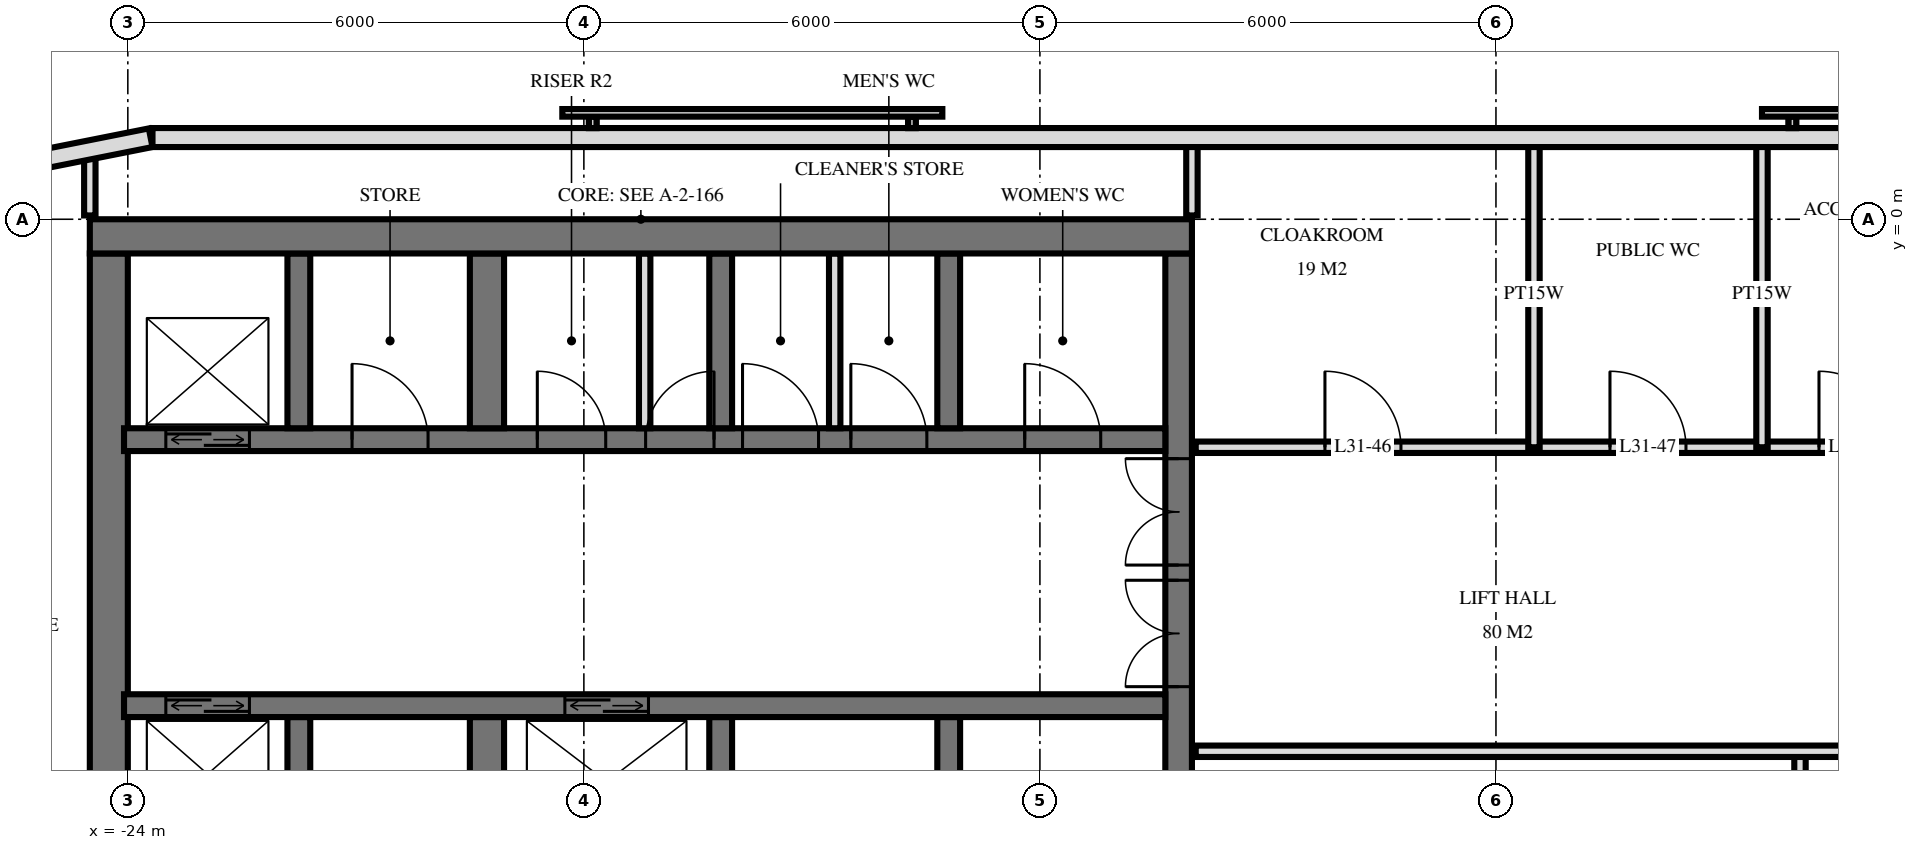
"""IFC4 building model, lengths in metres.
Left out: names, types, materials, properties, quantities, classifications, styles, units other than length and angle.
Written with IfcOpenShell. Run it as: python <this file> out.ifc"""

import sys

from ifc_helpers import new_model, si_unit, direction, frame, frame_2d, origin, place, context, subcontext, project, spatial, rectangle, extrude, element, fill, save


model = new_model("IFC4")
c1 = context("Model", 3, precision=1e-05, world=origin(), true_north=direction((0.0, 1.0)))
c2 = subcontext(c1, "Body", "Model", "MODEL_VIEW")
j1 = project(units=[si_unit("LENGTHUNIT", "METRE"), si_unit("PLANEANGLEUNIT", "RADIAN")], contexts=[c1])
p1 = place(None, origin())
s1 = spatial("IfcSite", under=j1, at=p1, CompositionType="ELEMENT")
p2 = place(p1, origin())
s2 = spatial("IfcBuilding", under=s1, at=p2, CompositionType="ELEMENT")
p3 = place(p2, frame((0.0, 0.0, 123.6)))
s3 = spatial("IfcBuildingStorey", under=s2, at=p3, CompositionType="ELEMENT", Elevation=123.6)
p4 = place(p3, frame((-24.5, -0.225, 0.0), z_axis=(0.0, 0.0, 1.0), x_axis=(1.0, 0.0, 0.0)))
e1 = element("IfcWall", 1, at=p4, inside=s3, PredefinedType="SHEAR", context=c2, shape_type="SweptSolid", body=[
    extrude(rectangle(XDim=14.5, YDim=0.45, at=frame_2d((7.25, 0.0))), origin(), (0.0, 0.0, 1.0), 3.6),
])
p5 = place(p3, frame((-10.175, -14.55, 0.0), z_axis=(0.0, 0.0, 1.0), x_axis=(0.0, 1.0, 0.0)))
e2 = element("IfcWall", 2, at=p5, inside=s3, PredefinedType="SHEAR", context=c2, shape_type="SweptSolid", body=[
    extrude(rectangle(XDim=14.1, YDim=0.35, at=frame_2d((7.05, 0.0))), origin(), (0.0, 0.0, 1.0), 3.6),
])
p6 = place(p5, frame((8.4, 0.0, 0.0)))
e3 = element("IfcOpeningElement", 3, at=p6, cuts=e2, PredefinedType="OPENING", context=c2, shape_type="SweptSolid", body=[
    extrude(rectangle(XDim=1.4, YDim=2.4, at=frame_2d((0.7, 1.2))), frame((0.0, 0.185, 0.0), z_axis=(0.0, -1.0, 0.0), x_axis=(1.0, 0.0, 0.0)), (0.0, 0.0, 1.0), 0.37),
])
p7 = place(p5, frame((10.0, 0.0, 0.0)))
e4 = element("IfcOpeningElement", 4, at=p7, cuts=e2, PredefinedType="OPENING", context=c2, shape_type="SweptSolid", body=[
    extrude(rectangle(XDim=1.4, YDim=2.4, at=frame_2d((0.7, 1.2))), frame((0.0, 0.185, 0.0), z_axis=(0.0, -1.0, 0.0), x_axis=(1.0, 0.0, 0.0)), (0.0, 0.0, 1.0), 0.37),
])
p8 = place(p5, frame((4.0, 0.0, 0.0)))
e5 = element("IfcOpeningElement", 5, at=p8, cuts=e2, PredefinedType="OPENING", context=c2, shape_type="SweptSolid", body=[
    extrude(rectangle(XDim=1.2, YDim=2.1, at=frame_2d((0.6, 1.05))), frame((0.0, 0.185, 0.0), z_axis=(0.0, -1.0, 0.0), x_axis=(1.0, 0.0, 0.0)), (0.0, 0.0, 1.0), 0.37),
])
p9 = place(p3, frame((-24.25, -14.55, 0.0), z_axis=(0.0, 0.0, 1.0), x_axis=(0.0, 1.0, 0.0)))
e6 = element("IfcWall", 6, at=p9, inside=s3, PredefinedType="SHEAR", context=c2, shape_type="SweptSolid", body=[
    extrude(rectangle(XDim=14.1, YDim=0.5, at=frame_2d((7.05, 0.0))), origin(), (0.0, 0.0, 1.0), 3.6),
])
p10 = place(p3, frame((-24.05, -2.9, 0.0), z_axis=(0.0, 0.0, 1.0), x_axis=(1.0, 0.0, 0.0)))
e7 = element("IfcWall", 7, at=p10, inside=s3, PredefinedType="SHEAR", context=c2, shape_type="SweptSolid", body=[
    extrude(rectangle(XDim=13.7, YDim=0.3, at=frame_2d((6.85, 0.0))), origin(), (0.0, 0.0, 1.0), 3.6),
])
p11 = place(p10, frame((0.55, 0.0, 0.0)))
e8 = element("IfcOpeningElement", 8, at=p11, cuts=e7, PredefinedType="OPENING", context=c2, shape_type="SweptSolid", body=[
    extrude(rectangle(XDim=1.1, YDim=2.1, at=frame_2d((0.55, 1.05))), frame((0.0, 0.16, 0.0), z_axis=(0.0, -1.0, 0.0), x_axis=(1.0, 0.0, 0.0)), (0.0, 0.0, 1.0), 0.32),
])
p12 = place(p10, frame((6.863, 0.0, 0.0)))
e9 = element("IfcOpeningElement", 9, at=p12, cuts=e7, PredefinedType="OPENING", context=c2, shape_type="SweptSolid", body=[
    extrude(rectangle(XDim=0.9, YDim=2.1, at=frame_2d((0.45, 1.05))), frame((0.0, 0.16, 0.0), z_axis=(0.0, -1.0, 0.0), x_axis=(1.0, 0.0, 0.0)), (0.0, 0.0, 1.0), 0.32),
])
p13 = place(p10, frame((5.438, 0.0, 0.0)))
e10 = element("IfcOpeningElement", 10, at=p13, cuts=e7, PredefinedType="OPENING", context=c2, shape_type="SweptSolid", body=[
    extrude(rectangle(XDim=0.9, YDim=2.1, at=frame_2d((0.45, 1.05))), frame((0.0, 0.16, 0.0), z_axis=(0.0, -1.0, 0.0), x_axis=(1.0, 0.0, 0.0)), (0.0, 0.0, 1.0), 0.32),
])
p14 = place(p10, frame((11.85, 0.0, 0.0)))
e11 = element("IfcOpeningElement", 11, at=p14, cuts=e7, PredefinedType="OPENING", context=c2, shape_type="SweptSolid", body=[
    extrude(rectangle(XDim=1.0, YDim=2.1, at=frame_2d((0.5, 1.05))), frame((0.0, 0.16, 0.0), z_axis=(0.0, -1.0, 0.0), x_axis=(1.0, 0.0, 0.0)), (0.0, 0.0, 1.0), 0.32),
])
p15 = place(p10, frame((9.562, 0.0, 0.0)))
e12 = element("IfcOpeningElement", 12, at=p15, cuts=e7, PredefinedType="OPENING", context=c2, shape_type="SweptSolid", body=[
    extrude(rectangle(XDim=1.0, YDim=2.1, at=frame_2d((0.5, 1.05))), frame((0.0, 0.16, 0.0), z_axis=(0.0, -1.0, 0.0), x_axis=(1.0, 0.0, 0.0)), (0.0, 0.0, 1.0), 0.32),
])
p16 = place(p10, frame((8.137, 0.0, 0.0)))
e13 = element("IfcOpeningElement", 13, at=p16, cuts=e7, PredefinedType="OPENING", context=c2, shape_type="SweptSolid", body=[
    extrude(rectangle(XDim=1.0, YDim=2.1, at=frame_2d((0.5, 1.05))), frame((0.0, 0.16, 0.0), z_axis=(0.0, -1.0, 0.0), x_axis=(1.0, 0.0, 0.0)), (0.0, 0.0, 1.0), 0.32),
])
p17 = place(p10, frame((3.0, 0.0, 0.0)))
e14 = element("IfcOpeningElement", 14, at=p17, cuts=e7, PredefinedType="OPENING", context=c2, shape_type="SweptSolid", body=[
    extrude(rectangle(XDim=1.0, YDim=2.1, at=frame_2d((0.5, 1.05))), frame((0.0, 0.16, 0.0), z_axis=(0.0, -1.0, 0.0), x_axis=(1.0, 0.0, 0.0)), (0.0, 0.0, 1.0), 0.32),
])
p18 = place(p3, frame((-24.05, -6.4, 0.0), z_axis=(0.0, 0.0, 1.0), x_axis=(1.0, 0.0, 0.0)))
e15 = element("IfcWall", 15, at=p18, inside=s3, PredefinedType="SHEAR", context=c2, shape_type="SweptSolid", body=[
    extrude(rectangle(XDim=13.7, YDim=0.3, at=frame_2d((6.85, 0.0))), origin(), (0.0, 0.0, 1.0), 3.6),
])
p19 = place(p18, frame((0.55, 0.0, 0.0)))
e16 = element("IfcOpeningElement", 16, at=p19, cuts=e15, PredefinedType="OPENING", context=c2, shape_type="SweptSolid", body=[
    extrude(rectangle(XDim=1.1, YDim=2.1, at=frame_2d((0.55, 1.05))), frame((0.0, 0.16, 0.0), z_axis=(0.0, -1.0, 0.0), x_axis=(1.0, 0.0, 0.0)), (0.0, 0.0, 1.0), 0.32),
])
p20 = place(p18, frame((5.8, 0.0, 0.0)))
e17 = element("IfcOpeningElement", 17, at=p20, cuts=e15, PredefinedType="OPENING", context=c2, shape_type="SweptSolid", body=[
    extrude(rectangle(XDim=1.1, YDim=2.1, at=frame_2d((0.55, 1.05))), frame((0.0, 0.16, 0.0), z_axis=(0.0, -1.0, 0.0), x_axis=(1.0, 0.0, 0.0)), (0.0, 0.0, 1.0), 0.32),
])
for number, where, z_axis, x_axis in (
    (18, (-13.2, -2.75, 0.0), (0.0, 0.0, 1.0), (0.0, 1.0, 0.0)),
    (19, (-13.2, -8.85, 0.0), (0.0, 0.0, 1.0), (0.0, 1.0, 0.0)),
    (20, (-16.2, -2.75, 0.0), (0.0, 0.0, 1.0), (0.0, 1.0, 0.0)),
    (21, (-16.2, -8.85, 0.0), (0.0, 0.0, 1.0), (0.0, 1.0, 0.0)),
):
    element("IfcWall", number, at=place(p3, frame(where, z_axis=z_axis, x_axis=x_axis)), inside=s3, PredefinedType="SHEAR", context=c2, shape_type="SweptSolid", body=[
        extrude(rectangle(XDim=2.3, YDim=0.3, at=frame_2d((1.15, 0.0))), origin(), (0.0, 0.0, 1.0), 3.6),
    ])
for number, where, z_axis, x_axis in (
    (22, (-19.275, -2.75, 0.0), (0.0, 0.0, 1.0), (0.0, 1.0, 0.0)),
    (23, (-19.275, -8.85, 0.0), (0.0, 0.0, 1.0), (0.0, 1.0, 0.0)),
):
    element("IfcWall", number, at=place(p3, frame(where, z_axis=z_axis, x_axis=x_axis)), inside=s3, PredefinedType="SHEAR", context=c2, shape_type="SweptSolid", body=[
        extrude(rectangle(XDim=2.3, YDim=0.45, at=frame_2d((1.15, 0.0))), origin(), (0.0, 0.0, 1.0), 3.6),
    ])
for number, where, z_axis, x_axis in (
    (24, (-21.75, -2.75, 0.0), (0.0, 0.0, 1.0), (0.0, 1.0, 0.0)),
    (25, (-21.75, -8.85, 0.0), (0.0, 0.0, 1.0), (0.0, 1.0, 0.0)),
):
    element("IfcWall", number, at=place(p3, frame(where, z_axis=z_axis, x_axis=x_axis)), inside=s3, PredefinedType="SHEAR", context=c2, shape_type="SweptSolid", body=[
        extrude(rectangle(XDim=2.3, YDim=0.3, at=frame_2d((1.15, 0.0))), origin(), (0.0, 0.0, 1.0), 3.6),
    ])
p21 = place(p3, frame((23.675, 1.075, 0.0), z_axis=(0.0, 0.0, 1.0), x_axis=(-1.0, 0.0, 0.0)))
e26 = element("IfcWall", 26, at=p21, inside=s3, PredefinedType="SOLIDWALL", context=c2, shape_type="SweptSolid", body=[
    extrude(rectangle(XDim=47.351, YDim=0.25, at=frame_2d((23.675, 0.0))), origin(), (0.0, 0.0, 1.0), 3.32),
])
p22 = place(p21, frame((15.275, 0.0, 0.3)))
e27 = element("IfcOpeningElement", 27, at=p22, cuts=e26, PredefinedType="OPENING", context=c2, shape_type="SweptSolid", body=[
    extrude(rectangle(XDim=2.4, YDim=2.1, at=frame_2d((1.2, 1.05))), frame((0.0, 0.135, 0.0), z_axis=(0.0, -1.0, 0.0), x_axis=(1.0, 0.0, 0.0)), (0.0, 0.0, 1.0), 0.27),
])
p23 = place(p21, frame((19.975, 0.0, 0.3)))
e28 = element("IfcOpeningElement", 28, at=p23, cuts=e26, PredefinedType="OPENING", context=c2, shape_type="SweptSolid", body=[
    extrude(rectangle(XDim=2.4, YDim=2.1, at=frame_2d((1.2, 1.05))), frame((0.0, 0.135, 0.0), z_axis=(0.0, -1.0, 0.0), x_axis=(1.0, 0.0, 0.0)), (0.0, 0.0, 1.0), 0.27),
])
p24 = place(p3, frame((-23.7, 1.073, 0.0), z_axis=(0.0, 0.0, 1.0), x_axis=(-0.980803419081, -0.194999110559, 0.0)))
e29 = element("IfcWall", 29, at=p24, inside=s3, PredefinedType="SOLIDWALL", context=c2, shape_type="SweptSolid", body=[
    extrude(rectangle(XDim=1.681, YDim=0.25, at=frame_2d((0.841, 0.0))), origin(), (0.0, 0.0, 1.0), 3.32),
])
for number, where, z_axis, x_axis in (
    (30, (-17.2, -2.75, 0.0), (0.0, 0.0, 1.0), (0.0, 1.0, 0.0)),
    (31, (-14.7, -2.75, 0.0), (0.0, 0.0, 1.0), (0.0, 1.0, 0.0)),
):
    element("IfcWall", number, at=place(p3, frame(where, z_axis=z_axis, x_axis=x_axis)), inside=s3, PredefinedType="PARTITIONING", context=c2, shape_type="SweptSolid", body=[
        extrude(rectangle(XDim=2.3, YDim=0.15, at=frame_2d((1.15, 0.0))), origin(), (0.0, 0.0, 1.0), 3.3),
    ])
p25 = place(p3, frame((-2.0, -11.0, 0.0), z_axis=(0.0, 0.0, 1.0), x_axis=(0.0, 1.0, 0.0)))
e32 = element("IfcWall", 32, at=p25, inside=s3, PredefinedType="PARTITIONING", context=c2, shape_type="SweptSolid", body=[
    extrude(rectangle(XDim=4.0, YDim=0.15, at=frame_2d((2.0, 0.0))), origin(), (0.0, 0.0, 1.0), 3.32),
])
for number, where, z_axis, x_axis in (
    (33, (-2.5, -3.0, 0.0), (0.0, 0.0, 1.0), (0.0, 1.0, 0.0)),
    (34, (-5.5, -3.0, 0.0), (0.0, 0.0, 1.0), (0.0, 1.0, 0.0)),
):
    element("IfcWall", number, at=place(p3, frame(where, z_axis=z_axis, x_axis=x_axis)), inside=s3, PredefinedType="PLUMBINGWALL", context=c2, shape_type="SweptSolid", body=[
        extrude(rectangle(XDim=4.02, YDim=0.15, at=frame_2d((2.01, 0.0))), origin(), (0.0, 0.0, 1.0), 3.32),
    ])
p26 = place(p3, frame((-10.0, 0.05, 0.0), z_axis=(0.0, 0.0, 1.0), x_axis=(0.0, 1.0, 0.0)))
e35 = element("IfcWall", 35, at=p26, inside=s3, PredefinedType="PARTITIONING", context=c2, shape_type="SweptSolid", body=[
    extrude(rectangle(XDim=0.97, YDim=0.15, at=frame_2d((0.485, 0.0))), origin(), (0.0, 0.0, 1.0), 3.32),
])
p27 = place(p3, frame((-24.5, 0.05, 0.0), z_axis=(0.0, 0.0, 1.0), x_axis=(0.0, 1.0, 0.0)))
e36 = element("IfcWall", 36, at=p27, inside=s3, PredefinedType="PARTITIONING", context=c2, shape_type="SweptSolid", body=[
    extrude(rectangle(XDim=0.807, YDim=0.15, at=frame_2d((0.404, 0.0))), origin(), (0.0, 0.0, 1.0), 3.32),
])
p28 = place(p3, frame((-9.95, -7.0, 0.0), z_axis=(0.0, 0.0, 1.0), x_axis=(1.0, 0.0, 0.0)))
e37 = element("IfcWall", 37, at=p28, inside=s3, PredefinedType="PARTITIONING", context=c2, shape_type="SweptSolid", body=[
    extrude(rectangle(XDim=19.9, YDim=0.15, at=frame_2d((9.95, 0.0))), origin(), (0.0, 0.0, 1.0), 3.32),
])
p29 = place(p28, frame((9.45, 0.0, 0.0)))
e38 = element("IfcOpeningElement", 38, at=p29, cuts=e37, PredefinedType="OPENING", context=c2, shape_type="SweptSolid", body=[
    extrude(rectangle(XDim=1.0, YDim=2.1, at=frame_2d((0.5, 1.05))), frame((0.0, 0.085, 0.0), z_axis=(0.0, -1.0, 0.0), x_axis=(1.0, 0.0, 0.0)), (0.0, 0.0, 1.0), 0.17),
])
p30 = place(p28, frame((15.45, 0.0, 0.0)))
e39 = element("IfcOpeningElement", 39, at=p30, cuts=e37, PredefinedType="OPENING", context=c2, shape_type="SweptSolid", body=[
    extrude(rectangle(XDim=1.0, YDim=2.1, at=frame_2d((0.5, 1.05))), frame((0.0, 0.085, 0.0), z_axis=(0.0, -1.0, 0.0), x_axis=(1.0, 0.0, 0.0)), (0.0, 0.0, 1.0), 0.17),
])
p31 = place(p3, frame((-9.95, -3.0, 0.0), z_axis=(0.0, 0.0, 1.0), x_axis=(1.0, 0.0, 0.0)))
e40 = element("IfcWall", 40, at=p31, inside=s3, PredefinedType="PARTITIONING", context=c2, shape_type="SweptSolid", body=[
    extrude(rectangle(XDim=19.9, YDim=0.15, at=frame_2d((9.95, 0.0))), origin(), (0.0, 0.0, 1.0), 3.32),
])
p32 = place(p31, frame((1.7, 0.0, 0.0)))
e41 = element("IfcOpeningElement", 41, at=p32, cuts=e40, PredefinedType="OPENING", context=c2, shape_type="SweptSolid", body=[
    extrude(rectangle(XDim=1.0, YDim=2.1, at=frame_2d((0.5, 1.05))), frame((0.0, 0.085, 0.0), z_axis=(0.0, -1.0, 0.0), x_axis=(1.0, 0.0, 0.0)), (0.0, 0.0, 1.0), 0.17),
])
p33 = place(p31, frame((5.45, 0.0, 0.0)))
e42 = element("IfcOpeningElement", 42, at=p33, cuts=e40, PredefinedType="OPENING", context=c2, shape_type="SweptSolid", body=[
    extrude(rectangle(XDim=1.0, YDim=2.1, at=frame_2d((0.5, 1.05))), frame((0.0, 0.085, 0.0), z_axis=(0.0, -1.0, 0.0), x_axis=(1.0, 0.0, 0.0)), (0.0, 0.0, 1.0), 0.17),
])
p34 = place(p31, frame((8.2, 0.0, 0.0)))
e43 = element("IfcOpeningElement", 43, at=p34, cuts=e40, PredefinedType="OPENING", context=c2, shape_type="SweptSolid", body=[
    extrude(rectangle(XDim=1.0, YDim=2.1, at=frame_2d((0.5, 1.05))), frame((0.0, 0.085, 0.0), z_axis=(0.0, -1.0, 0.0), x_axis=(1.0, 0.0, 0.0)), (0.0, 0.0, 1.0), 0.17),
])
p35 = place(p31, frame((11.95, 0.0, 0.0)))
e44 = element("IfcOpeningElement", 44, at=p35, cuts=e40, PredefinedType="OPENING", context=c2, shape_type="SweptSolid", body=[
    extrude(rectangle(XDim=1.0, YDim=2.1, at=frame_2d((0.5, 1.05))), frame((0.0, 0.085, 0.0), z_axis=(0.0, -1.0, 0.0), x_axis=(1.0, 0.0, 0.0)), (0.0, 0.0, 1.0), 0.17),
])
p36 = place(p31, frame((16.95, 0.0, 0.0)))
e45 = element("IfcOpeningElement", 45, at=p36, cuts=e40, PredefinedType="OPENING", context=c2, shape_type="SweptSolid", body=[
    extrude(rectangle(XDim=1.0, YDim=2.1, at=frame_2d((0.5, 1.05))), frame((0.0, 0.085, 0.0), z_axis=(0.0, -1.0, 0.0), x_axis=(1.0, 0.0, 0.0)), (0.0, 0.0, 1.0), 0.17),
])
p37 = place(p11, origin())
e46 = element("IfcDoor", 46, at=p37, inside=s3, OperationType="DOUBLE_DOOR_SLIDING", PredefinedType="USERDEFINED", context=c2, shape_type="SweptSolid", body=[
    extrude(rectangle(XDim=1.1, YDim=2.1, at=frame_2d((0.55, 1.05))), frame((0.0, 0.025, 0.0), z_axis=(0.0, -1.0, 0.0), x_axis=(1.0, 0.0, 0.0)), (0.0, 0.0, 1.0), 0.05),
])
fill(e8, e46)
p38 = place(p19, origin())
e47 = element("IfcDoor", 47, at=p38, inside=s3, OperationType="DOUBLE_DOOR_SLIDING", PredefinedType="USERDEFINED", context=c2, shape_type="SweptSolid", body=[
    extrude(rectangle(XDim=1.1, YDim=2.1, at=frame_2d((0.55, 1.05))), frame((0.0, 0.025, 0.0), z_axis=(0.0, -1.0, 0.0), x_axis=(1.0, 0.0, 0.0)), (0.0, 0.0, 1.0), 0.05),
])
fill(e16, e47)
p39 = place(p20, origin())
e48 = element("IfcDoor", 48, at=p39, inside=s3, OperationType="DOUBLE_DOOR_SLIDING", PredefinedType="USERDEFINED", context=c2, shape_type="SweptSolid", body=[
    extrude(rectangle(XDim=1.1, YDim=2.1, at=frame_2d((0.55, 1.05))), frame((0.0, 0.025, 0.0), z_axis=(0.0, -1.0, 0.0), x_axis=(1.0, 0.0, 0.0)), (0.0, 0.0, 1.0), 0.05),
])
fill(e17, e48)
p40 = place(p6, origin())
e49 = element("IfcDoor", 49, at=p40, inside=s3, OperationType="DOUBLE_DOOR_SINGLE_SWING", PredefinedType="DOOR", context=c2, shape_type="SweptSolid", body=[
    extrude(rectangle(XDim=1.4, YDim=2.4, at=frame_2d((0.7, 1.2))), frame((0.0, 0.025, 0.0), z_axis=(0.0, -1.0, 0.0), x_axis=(1.0, 0.0, 0.0)), (0.0, 0.0, 1.0), 0.05),
])
fill(e3, e49)
p41 = place(p7, origin())
e50 = element("IfcDoor", 50, at=p41, inside=s3, OperationType="DOUBLE_DOOR_SINGLE_SWING", PredefinedType="DOOR", context=c2, shape_type="SweptSolid", body=[
    extrude(rectangle(XDim=1.4, YDim=2.4, at=frame_2d((0.7, 1.2))), frame((0.0, 0.025, 0.0), z_axis=(0.0, -1.0, 0.0), x_axis=(1.0, 0.0, 0.0)), (0.0, 0.0, 1.0), 0.05),
])
fill(e4, e50)
p42 = place(p12, origin())
e51 = element("IfcDoor", 51, at=p42, inside=s3, OperationType="SINGLE_SWING_LEFT", PredefinedType="DOOR", context=c2, shape_type="SweptSolid", body=[
    extrude(rectangle(XDim=0.9, YDim=2.1, at=frame_2d((0.45, 1.05))), frame((0.0, 0.025, 0.0), z_axis=(0.0, -1.0, 0.0), x_axis=(1.0, 0.0, 0.0)), (0.0, 0.0, 1.0), 0.05),
])
fill(e9, e51)
p43 = place(p13, origin())
e52 = element("IfcDoor", 52, at=p43, inside=s3, OperationType="SINGLE_SWING_RIGHT", PredefinedType="DOOR", context=c2, shape_type="SweptSolid", body=[
    extrude(rectangle(XDim=0.9, YDim=2.1, at=frame_2d((0.45, 1.05))), frame((0.0, 0.025, 0.0), z_axis=(0.0, -1.0, 0.0), x_axis=(1.0, 0.0, 0.0)), (0.0, 0.0, 1.0), 0.05),
])
fill(e10, e52)
p44 = place(p14, origin())
e53 = element("IfcDoor", 53, at=p44, inside=s3, OperationType="SINGLE_SWING_RIGHT", PredefinedType="DOOR", context=c2, shape_type="SweptSolid", body=[
    extrude(rectangle(XDim=1.0, YDim=2.1, at=frame_2d((0.5, 1.05))), frame((0.0, 0.025, 0.0), z_axis=(0.0, -1.0, 0.0), x_axis=(1.0, 0.0, 0.0)), (0.0, 0.0, 1.0), 0.05),
])
fill(e11, e53)
p45 = place(p15, origin())
e54 = element("IfcDoor", 54, at=p45, inside=s3, OperationType="SINGLE_SWING_RIGHT", PredefinedType="DOOR", context=c2, shape_type="SweptSolid", body=[
    extrude(rectangle(XDim=1.0, YDim=2.1, at=frame_2d((0.5, 1.05))), frame((0.0, 0.025, 0.0), z_axis=(0.0, -1.0, 0.0), x_axis=(1.0, 0.0, 0.0)), (0.0, 0.0, 1.0), 0.05),
])
fill(e12, e54)
p46 = place(p16, origin())
e55 = element("IfcDoor", 55, at=p46, inside=s3, OperationType="SINGLE_SWING_RIGHT", PredefinedType="DOOR", context=c2, shape_type="SweptSolid", body=[
    extrude(rectangle(XDim=1.0, YDim=2.1, at=frame_2d((0.5, 1.05))), frame((0.0, 0.025, 0.0), z_axis=(0.0, -1.0, 0.0), x_axis=(1.0, 0.0, 0.0)), (0.0, 0.0, 1.0), 0.05),
])
fill(e13, e55)
p47 = place(p17, origin())
e56 = element("IfcDoor", 56, at=p47, inside=s3, OperationType="SINGLE_SWING_RIGHT", PredefinedType="DOOR", context=c2, shape_type="SweptSolid", body=[
    extrude(rectangle(XDim=1.0, YDim=2.1, at=frame_2d((0.5, 1.05))), frame((0.0, 0.025, 0.0), z_axis=(0.0, -1.0, 0.0), x_axis=(1.0, 0.0, 0.0)), (0.0, 0.0, 1.0), 0.05),
])
fill(e14, e56)
p48 = place(p32, origin())
e57 = element("IfcDoor", 57, at=p48, inside=s3, OperationType="SINGLE_SWING_RIGHT", PredefinedType="DOOR", context=c2, shape_type="SweptSolid", body=[
    extrude(rectangle(XDim=1.0, YDim=2.1, at=frame_2d((0.5, 1.05))), frame((0.0, 0.025, 0.0), z_axis=(0.0, -1.0, 0.0), x_axis=(1.0, 0.0, 0.0)), (0.0, 0.0, 1.0), 0.05),
])
fill(e41, e57)
p49 = place(p33, origin())
e58 = element("IfcDoor", 58, at=p49, inside=s3, OperationType="SINGLE_SWING_RIGHT", PredefinedType="DOOR", context=c2, shape_type="SweptSolid", body=[
    extrude(rectangle(XDim=1.0, YDim=2.1, at=frame_2d((0.5, 1.05))), frame((0.0, 0.025, 0.0), z_axis=(0.0, -1.0, 0.0), x_axis=(1.0, 0.0, 0.0)), (0.0, 0.0, 1.0), 0.05),
])
fill(e42, e58)
p50 = place(p34, origin())
e59 = element("IfcDoor", 59, at=p50, inside=s3, OperationType="SINGLE_SWING_RIGHT", PredefinedType="DOOR", context=c2, shape_type="SweptSolid", body=[
    extrude(rectangle(XDim=1.0, YDim=2.1, at=frame_2d((0.5, 1.05))), frame((0.0, 0.025, 0.0), z_axis=(0.0, -1.0, 0.0), x_axis=(1.0, 0.0, 0.0)), (0.0, 0.0, 1.0), 0.05),
])
fill(e43, e59)
save(model, sys.argv[1])
